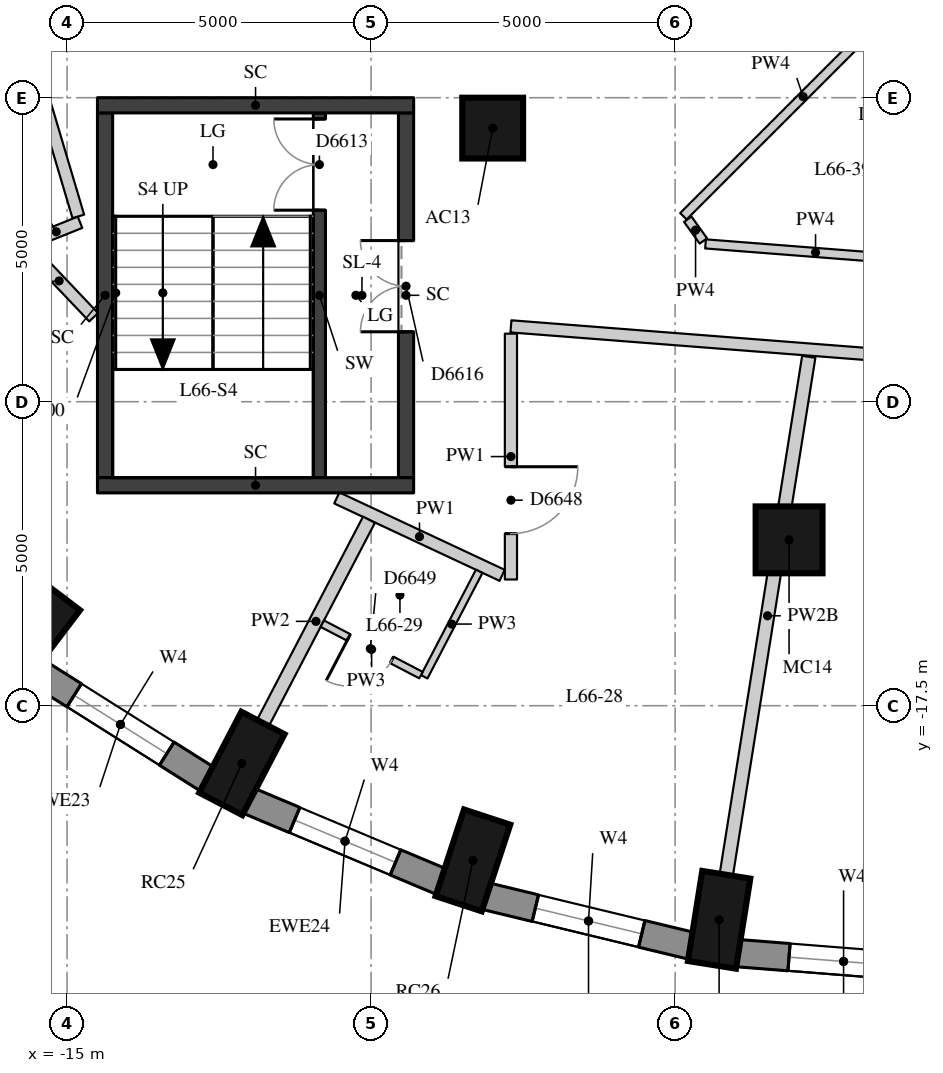
"""IFC4 building model, lengths in metres.
Left out: names, types, materials, properties, quantities, classifications, styles, units other than length and angle.
Written with IfcOpenShell. Run it as: python <this file> out.ifc"""

import sys

from ifc_helpers import new_model, si_unit, direction, frame, frame_2d, origin, origin_2d, place, context, subcontext, project, spatial, rectangle, extrude, element, fill, save


model = new_model("IFC4")
c1 = context("Model", 3, precision=1e-05, world=origin(), true_north=direction((0.0, 1.0)))
c2 = subcontext(c1, "Body", "Model", "MODEL_VIEW")
j1 = project(units=[si_unit("LENGTHUNIT", "METRE"), si_unit("PLANEANGLEUNIT", "RADIAN")], contexts=[c1])
p1 = place(None, origin())
s1 = spatial("IfcSite", under=j1, at=p1, CompositionType="ELEMENT")
p2 = place(p1, origin())
s2 = spatial("IfcBuilding", under=s1, at=p2, CompositionType="ELEMENT")
p3 = place(p2, frame((0.0, 0.0, 233.3)))
s3 = spatial("IfcBuildingStorey", under=s2, at=p3, CompositionType="ELEMENT", Elevation=233.3)
for number, where, z_axis, x_axis in (
    (1, (-15.559, -16.285, 0.0), (0.0, 0.0, 1.0), (-0.604, -0.797, 0.0)),
    (2, (-12.125, -18.449, 0.0), (0.0, 0.0, 1.0), (-0.462, -0.887, 0.0)),
    (3, (-8.326, -20.044, 0.0), (0.0, 0.0, 1.0), (-0.312, -0.95, 0.0)),
    (4, (-4.276, -21.021, 0.0), (0.0, 0.0, 1.0), (-0.157, -0.988, 0.0)),
):
    element("IfcColumn", number, at=place(p3, frame(where, z_axis=z_axis, x_axis=x_axis)), inside=s3, PredefinedType="COLUMN", context=c2, shape_type="SweptSolid", body=[
        extrude(rectangle(XDim=1.5, YDim=0.8, at=origin_2d()), origin(), (0.0, 0.0, 1.0), 3.3),
    ])
p4 = place(p3, frame((-8.0, -8.0, 0.0), z_axis=(0.0, 0.0, 1.0), x_axis=(1.0, 0.0, 0.0)))
e5 = element("IfcColumn", 5, at=p4, inside=s3, PredefinedType="COLUMN", context=c2, shape_type="SweptSolid", body=[
    extrude(rectangle(XDim=1.0, YDim=1.0, at=origin_2d()), origin(), (0.0, 0.0, 1.0), 3.3),
])
p5 = place(p3, frame((-3.126, -14.772, 0.0), z_axis=(0.0, 0.0, 1.0), x_axis=(1.0, 0.0, 0.0)))
e6 = element("IfcColumn", 6, at=p5, inside=s3, PredefinedType="COLUMN", context=c2, shape_type="SweptSolid", body=[
    extrude(rectangle(XDim=1.1, YDim=1.1, at=origin_2d()), origin(), (0.0, 0.0, 1.0), 3.3),
])
p6 = place(p3, frame((-15.553, -16.906, 0.0), z_axis=(0.0, 0.0, 1.0), x_axis=(0.845929139811, -0.53329531258, 0.0)))
e7 = element("IfcWall", 7, at=p6, inside=s3, PredefinedType="SOLIDWALL", context=c2, shape_type="SweptSolid", body=[
    extrude(rectangle(XDim=3.385, YDim=0.45, at=frame_2d((1.692, 0.0))), origin(), (0.0, 0.0, 1.0), 3.02),
])
p7 = place(p6, frame((0.792, 0.0, 0.4)))
e8 = element("IfcOpeningElement", 8, at=p7, cuts=e7, PredefinedType="OPENING", context=c2, shape_type="SweptSolid", body=[
    extrude(rectangle(XDim=1.8, YDim=1.75, at=frame_2d((0.9, 0.875))), frame((0.0, 0.235, 0.0), z_axis=(0.0, -1.0, 0.0), x_axis=(1.0, 0.0, 0.0)), (0.0, 0.0, 1.0), 0.47),
])
p8 = place(p3, frame((-12.016, -19.062, 0.0), z_axis=(0.0, 0.0, 1.0), x_axis=(0.922049934692, -0.3870709469, 0.0)))
e9 = element("IfcWall", 9, at=p8, inside=s3, PredefinedType="SOLIDWALL", context=c2, shape_type="SweptSolid", body=[
    extrude(rectangle(XDim=3.443, YDim=0.45, at=frame_2d((1.722, 0.0))), origin(), (0.0, 0.0, 1.0), 3.02),
])
p9 = place(p8, frame((0.822, 0.0, 0.4)))
e10 = element("IfcOpeningElement", 10, at=p9, cuts=e9, PredefinedType="OPENING", context=c2, shape_type="SweptSolid", body=[
    extrude(rectangle(XDim=1.8, YDim=1.75, at=frame_2d((0.9, 0.875))), frame((0.0, 0.235, 0.0), z_axis=(0.0, -1.0, 0.0), x_axis=(1.0, 0.0, 0.0)), (0.0, 0.0, 1.0), 0.47),
])
p10 = place(p3, frame((-8.119, -20.632, 0.0), z_axis=(0.0, 0.0, 1.0), x_axis=(0.972115243017, -0.234503633859, 0.0)))
e11 = element("IfcWall", 11, at=p10, inside=s3, PredefinedType="SOLIDWALL", context=c2, shape_type="SweptSolid", body=[
    extrude(rectangle(XDim=3.487, YDim=0.45, at=frame_2d((1.743, 0.0))), origin(), (0.0, 0.0, 1.0), 3.02),
])
p11 = place(p10, frame((0.843, 0.0, 0.4)))
e12 = element("IfcOpeningElement", 12, at=p11, cuts=e11, PredefinedType="OPENING", context=c2, shape_type="SweptSolid", body=[
    extrude(rectangle(XDim=1.8, YDim=1.75, at=frame_2d((0.9, 0.875))), frame((0.0, 0.235, 0.0), z_axis=(0.0, -1.0, 0.0), x_axis=(1.0, 0.0, 0.0)), (0.0, 0.0, 1.0), 0.47),
])
p12 = place(p3, frame((-3.979, -21.569, 0.0), z_axis=(0.0, 0.0, 1.0), x_axis=(0.996910775835, -0.078542377245, 0.0)))
e13 = element("IfcWall", 13, at=p12, inside=s3, PredefinedType="SOLIDWALL", context=c2, shape_type="SweptSolid", body=[
    extrude(rectangle(XDim=3.509, YDim=0.45, at=frame_2d((1.755, 0.0))), origin(), (0.0, 0.0, 1.0), 3.02),
])
p13 = place(p12, frame((0.855, 0.0, 0.4)))
e14 = element("IfcOpeningElement", 14, at=p13, cuts=e13, PredefinedType="OPENING", context=c2, shape_type="SweptSolid", body=[
    extrude(rectangle(XDim=1.8, YDim=1.75, at=frame_2d((0.9, 0.875))), frame((0.0, 0.235, 0.0), z_axis=(0.0, -1.0, 0.0), x_axis=(1.0, 0.0, 0.0)), (0.0, 0.0, 1.0), 0.47),
])
p14 = place(p3, frame((-10.85, -13.75, 0.0), z_axis=(0.0, 0.0, 1.0), x_axis=(0.0, 1.0, 0.0)))
e15 = element("IfcWall", 15, at=p14, inside=s3, PredefinedType="SHEAR", context=c2, shape_type="SweptSolid", body=[
    extrude(rectangle(XDim=6.0, YDim=0.2, at=frame_2d((3.0, 0.0))), origin(), (0.0, 0.0, 1.0), 3.02),
])
p15 = place(p14, frame((4.4, 0.0, 0.0)))
e16 = element("IfcOpeningElement", 16, at=p15, cuts=e15, PredefinedType="OPENING", context=c2, shape_type="SweptSolid", body=[
    extrude(rectangle(XDim=1.5, YDim=2.1, at=frame_2d((0.75, 1.05))), frame((0.0, 0.11, 0.0), z_axis=(0.0, -1.0, 0.0), x_axis=(1.0, 0.0, 0.0)), (0.0, 0.0, 1.0), 0.22),
])
p16 = place(p3, frame((-14.375, -13.75, -0.28), z_axis=(0.0, 0.0, 1.0), x_axis=(0.0, 1.0, 0.0)))
e17 = element("IfcWall", 17, at=p16, inside=s3, PredefinedType="SHEAR", context=c2, shape_type="SweptSolid", body=[
    extrude(rectangle(XDim=6.0, YDim=0.25, at=frame_2d((3.0, 0.0))), origin(), (0.0, 0.0, 1.0), 3.3),
])
p17 = place(p3, frame((-9.425, -13.75, -0.28), z_axis=(0.0, 0.0, 1.0), x_axis=(0.0, 1.0, 0.0)))
e18 = element("IfcWall", 18, at=p17, inside=s3, PredefinedType="SHEAR", context=c2, shape_type="SweptSolid", body=[
    extrude(rectangle(XDim=6.0, YDim=0.25, at=frame_2d((3.0, 0.0))), origin(), (0.0, 0.0, 1.0), 3.3),
])
p18 = place(p17, frame((2.4, 0.0, 0.28)))
e19 = element("IfcOpeningElement", 19, at=p18, cuts=e18, PredefinedType="OPENING", context=c2, shape_type="SweptSolid", body=[
    extrude(rectangle(XDim=1.5, YDim=2.1, at=frame_2d((0.75, 1.05))), frame((0.0, 0.135, 0.0), z_axis=(0.0, -1.0, 0.0), x_axis=(1.0, 0.0, 0.0)), (0.0, 0.0, 1.0), 0.27),
])
for number, where, z_axis, x_axis in (
    (20, (-14.5, -7.625, -0.28), (0.0, 0.0, 1.0), (1.0, 0.0, 0.0)),
    (21, (-14.5, -13.875, -0.28), (0.0, 0.0, 1.0), (1.0, 0.0, 0.0)),
):
    element("IfcWall", number, at=place(p3, frame(where, z_axis=z_axis, x_axis=x_axis)), inside=s3, PredefinedType="SHEAR", context=c2, shape_type="SweptSolid", body=[
        extrude(rectangle(XDim=5.2, YDim=0.25, at=frame_2d((2.6, 0.0))), origin(), (0.0, 0.0, 1.0), 3.3),
    ])
p19 = place(p3, frame((5.542, -12.29, 0.0), z_axis=(0.0, 0.0, 1.0), x_axis=(-0.996994281558, 0.077475173702, 0.0)))
e22 = element("IfcWall", 22, at=p19, inside=s3, PredefinedType="PARTITIONING", context=c2, shape_type="SweptSolid", body=[
    extrude(rectangle(XDim=13.282, YDim=0.2, at=frame_2d((6.641, 0.0))), origin(), (0.0, 0.0, 1.0), 3.02),
])
p20 = place(p19, frame((2.412, 0.0, 0.0)))
e23 = element("IfcOpeningElement", 23, at=p20, cuts=e22, PredefinedType="OPENING", context=c2, shape_type="SweptSolid", body=[
    extrude(rectangle(XDim=1.1, YDim=2.1, at=frame_2d((0.55, 1.05))), frame((0.0, 0.11, 0.0), z_axis=(0.0, -1.0, 0.0), x_axis=(1.0, 0.0, 0.0)), (0.0, 0.0, 1.0), 0.22),
])
p21 = place(p3, frame((-7.7, -11.381, 0.0), z_axis=(0.0, 0.0, 1.0), x_axis=(0.0, -1.0, 0.0)))
e24 = element("IfcWall", 24, at=p21, inside=s3, PredefinedType="PARTITIONING", context=c2, shape_type="SweptSolid", body=[
    extrude(rectangle(XDim=4.043, YDim=0.2, at=frame_2d((2.021, 0.0))), origin(), (0.0, 0.0, 1.0), 3.02),
])
p22 = place(p21, frame((2.189, 0.0, 0.0)))
e25 = element("IfcOpeningElement", 25, at=p22, cuts=e24, PredefinedType="OPENING", context=c2, shape_type="SweptSolid", body=[
    extrude(rectangle(XDim=1.1, YDim=2.1, at=frame_2d((0.55, 1.05))), frame((0.0, 0.11, 0.0), z_axis=(0.0, -1.0, 0.0), x_axis=(1.0, 0.0, 0.0)), (0.0, 0.0, 1.0), 0.22),
])
p23 = place(p3, frame((-7.844, -15.356, 0.0), z_axis=(0.0, 0.0, 1.0), x_axis=(-0.90567561184, 0.423971327001, 0.0)))
e26 = element("IfcWall", 26, at=p23, inside=s3, PredefinedType="PARTITIONING", context=c2, shape_type="SweptSolid", body=[
    extrude(rectangle(XDim=3.002, YDim=0.2, at=frame_2d((1.501, 0.0))), origin(), (0.0, 0.0, 1.0), 3.02),
])
p24 = place(p3, frame((-14.563, -11.111, 0.0), z_axis=(0.0, 0.0, 1.0), x_axis=(-0.688574238414, 0.725165855645, 0.0)))
e27 = element("IfcWall", 27, at=p24, inside=s3, PredefinedType="PARTITIONING", context=c2, shape_type="SweptSolid", body=[
    extrude(rectangle(XDim=1.648, YDim=0.2, at=frame_2d((0.824, 0.0))), origin(), (0.0, 0.0, 1.0), 3.02),
])
p25 = place(p3, frame((-15.568, -9.863, 0.0), z_axis=(0.0, 0.0, 1.0), x_axis=(0.92779485846, 0.373090740457, 0.0)))
e28 = element("IfcWall", 28, at=p25, inside=s3, PredefinedType="PARTITIONING", context=c2, shape_type="SweptSolid", body=[
    extrude(rectangle(XDim=0.842, YDim=0.2, at=frame_2d((0.421, 0.0))), origin(), (0.0, 0.0, 1.0), 3.02),
])
p26 = place(p3, frame((-14.815, -9.452, 0.0), z_axis=(0.0, 0.0, 1.0), x_axis=(-0.284600079658, 0.958646334504, 0.0)))
e29 = element("IfcWall", 29, at=p26, inside=s3, PredefinedType="PARTITIONING", context=c2, shape_type="SweptSolid", body=[
    extrude(rectangle(XDim=3.914, YDim=0.2, at=frame_2d((1.957, 0.0))), origin(), (0.0, 0.0, 1.0), 3.02),
])
p27 = place(p3, frame((-0.88, -10.186, 0.0), z_axis=(0.0, 0.0, 1.0), x_axis=(-0.996990060313, 0.077529475925, 0.0)))
e30 = element("IfcWall", 30, at=p27, inside=s3, PredefinedType="PARTITIONING", context=c2, shape_type="SweptSolid", body=[
    extrude(rectangle(XDim=3.631, YDim=0.15, at=frame_2d((1.815, 0.0))), origin(), (0.0, 0.0, 1.0), 3.02),
])
p28 = place(p3, frame((-4.535, -9.856, 0.0), z_axis=(0.0, 0.0, 1.0), x_axis=(-0.583807558681, 0.811892070676, 0.0)))
e31 = element("IfcWall", 31, at=p28, inside=s3, PredefinedType="PARTITIONING", context=c2, shape_type="SweptSolid", body=[
    extrude(rectangle(XDim=0.44, YDim=0.15, at=frame_2d((0.22, 0.0))), origin(), (0.0, 0.0, 1.0), 3.02),
])
p29 = place(p3, frame((-4.864, -9.45, 0.0), z_axis=(0.0, 0.0, 1.0), x_axis=(0.707106781187, 0.707106781187, 0.0)))
e32 = element("IfcWall", 32, at=p29, inside=s3, PredefinedType="PARTITIONING", context=c2, shape_type="SweptSolid", body=[
    extrude(rectangle(XDim=5.566, YDim=0.15, at=frame_2d((2.783, 0.0))), origin(), (0.0, 0.0, 1.0), 3.02),
])
p30 = place(p3, frame((-11.778, -17.784, 0.0), z_axis=(0.0, 0.0, 1.0), x_axis=(0.462428808932, 0.886656414103, 0.0)))
e33 = element("IfcWall", 33, at=p30, inside=s3, PredefinedType="PARTITIONING", context=c2, shape_type="SweptSolid", body=[
    extrude(rectangle(XDim=3.771, YDim=0.22, at=frame_2d((1.885, 0.0))), origin(), (0.0, 0.0, 1.0), 3.02),
])
p31 = place(p3, frame((-4.158, -20.281, 0.0), z_axis=(0.0, 0.0, 1.0), x_axis=(0.157248675007, 0.987559038341, 0.0)))
e34 = element("IfcWall", 34, at=p31, inside=s3, PredefinedType="PARTITIONING", context=c2, shape_type="SweptSolid", body=[
    extrude(rectangle(XDim=8.626, YDim=0.22, at=frame_2d((4.313, 0.0))), origin(), (0.0, 0.0, 1.0), 2.57),
])
p32 = place(p3, frame((-8.222, -15.29, 0.0), z_axis=(0.0, 0.0, 1.0), x_axis=(-0.46232711024, -0.886709446853, 0.0)))
e35 = element("IfcWall", 35, at=p32, inside=s3, PredefinedType="PARTITIONING", context=c2, shape_type="SweptSolid", body=[
    extrude(rectangle(XDim=1.956, YDim=0.12, at=frame_2d((0.978, 0.0))), origin(), (0.0, 0.0, 1.0), 3.02),
])
p33 = place(p3, frame((-9.18, -16.997, 0.0), z_axis=(0.0, 0.0, 1.0), x_axis=(-0.886720410479, 0.462306082201, 0.0)))
e36 = element("IfcWall", 36, at=p33, inside=s3, PredefinedType="PARTITIONING", context=c2, shape_type="SweptSolid", body=[
    extrude(rectangle(XDim=1.83, YDim=0.12, at=frame_2d((0.915, 0.0))), origin(), (0.0, 0.0, 1.0), 3.02),
])
p34 = place(p33, frame((0.54, 0.0, 0.0)))
e37 = element("IfcOpeningElement", 37, at=p34, cuts=e36, PredefinedType="OPENING", context=c2, shape_type="SweptSolid", body=[
    extrude(rectangle(XDim=0.8, YDim=2.1, at=frame_2d((0.4, 1.05))), frame((0.0, 0.07, 0.0), z_axis=(0.0, -1.0, 0.0), x_axis=(1.0, 0.0, 0.0)), (0.0, 0.0, 1.0), 0.14),
])
p35 = place(p7, origin())
e38 = element("IfcWindow", 38, at=p35, inside=s3, PartitioningType="SINGLE_PANEL", PredefinedType="WINDOW", context=c2, shape_type="SweptSolid", body=[
    extrude(rectangle(XDim=1.8, YDim=1.75, at=frame_2d((0.9, 0.875))), frame((0.0, 0.035, 0.0), z_axis=(0.0, -1.0, 0.0), x_axis=(1.0, 0.0, 0.0)), (0.0, 0.0, 1.0), 0.06),
])
fill(e8, e38)
p36 = place(p9, origin())
e39 = element("IfcWindow", 39, at=p36, inside=s3, PartitioningType="SINGLE_PANEL", PredefinedType="WINDOW", context=c2, shape_type="SweptSolid", body=[
    extrude(rectangle(XDim=1.8, YDim=1.75, at=frame_2d((0.9, 0.875))), frame((0.0, 0.035, 0.0), z_axis=(0.0, -1.0, 0.0), x_axis=(1.0, 0.0, 0.0)), (0.0, 0.0, 1.0), 0.06),
])
fill(e10, e39)
p37 = place(p11, origin())
e40 = element("IfcWindow", 40, at=p37, inside=s3, PartitioningType="SINGLE_PANEL", PredefinedType="WINDOW", context=c2, shape_type="SweptSolid", body=[
    extrude(rectangle(XDim=1.8, YDim=1.75, at=frame_2d((0.9, 0.875))), frame((0.0, 0.035, 0.0), z_axis=(0.0, -1.0, 0.0), x_axis=(1.0, 0.0, 0.0)), (0.0, 0.0, 1.0), 0.06),
])
fill(e12, e40)
p38 = place(p13, origin())
e41 = element("IfcWindow", 41, at=p38, inside=s3, PartitioningType="SINGLE_PANEL", PredefinedType="WINDOW", context=c2, shape_type="SweptSolid", body=[
    extrude(rectangle(XDim=1.8, YDim=1.75, at=frame_2d((0.9, 0.875))), frame((0.0, 0.035, 0.0), z_axis=(0.0, -1.0, 0.0), x_axis=(1.0, 0.0, 0.0)), (0.0, 0.0, 1.0), 0.06),
])
fill(e14, e41)
p39 = place(p15, origin())
e42 = element("IfcDoor", 42, at=p39, inside=s3, OperationType="DOUBLE_DOOR_SINGLE_SWING", PredefinedType="DOOR", context=c2, shape_type="SweptSolid", body=[
    extrude(rectangle(XDim=1.5, YDim=2.1, at=frame_2d((0.75, 1.05))), frame((0.0, 0.025, 0.0), z_axis=(0.0, -1.0, 0.0), x_axis=(1.0, 0.0, 0.0)), (0.0, 0.0, 1.0), 0.05),
])
fill(e16, e42)
p40 = place(p18, origin())
e43 = element("IfcDoor", 43, at=p40, inside=s3, OperationType="DOUBLE_DOOR_SINGLE_SWING", PredefinedType="DOOR", context=c2, shape_type="SweptSolid", body=[
    extrude(rectangle(XDim=1.5, YDim=2.1, at=frame_2d((0.75, 1.05))), frame((0.0, 0.025, 0.0), z_axis=(0.0, -1.0, 0.0), x_axis=(1.0, 0.0, 0.0)), (0.0, 0.0, 1.0), 0.05),
])
fill(e19, e43)
p41 = place(p22, origin())
e44 = element("IfcDoor", 44, at=p41, inside=s3, OperationType="SINGLE_SWING_LEFT", PredefinedType="DOOR", context=c2, shape_type="SweptSolid", body=[
    extrude(rectangle(XDim=1.1, YDim=2.1, at=frame_2d((0.55, 1.05))), frame((0.0, 0.025, 0.0), z_axis=(0.0, -1.0, 0.0), x_axis=(1.0, 0.0, 0.0)), (0.0, 0.0, 1.0), 0.05),
])
fill(e25, e44)
p42 = place(p34, origin())
e45 = element("IfcDoor", 45, at=p42, inside=s3, OperationType="SINGLE_SWING_RIGHT", PredefinedType="DOOR", context=c2, shape_type="SweptSolid", body=[
    extrude(rectangle(XDim=0.8, YDim=2.1, at=frame_2d((0.4, 1.05))), frame((0.0, 0.025, 0.0), z_axis=(0.0, -1.0, 0.0), x_axis=(1.0, 0.0, 0.0)), (0.0, 0.0, 1.0), 0.05),
])
fill(e37, e45)
save(model, sys.argv[1])
